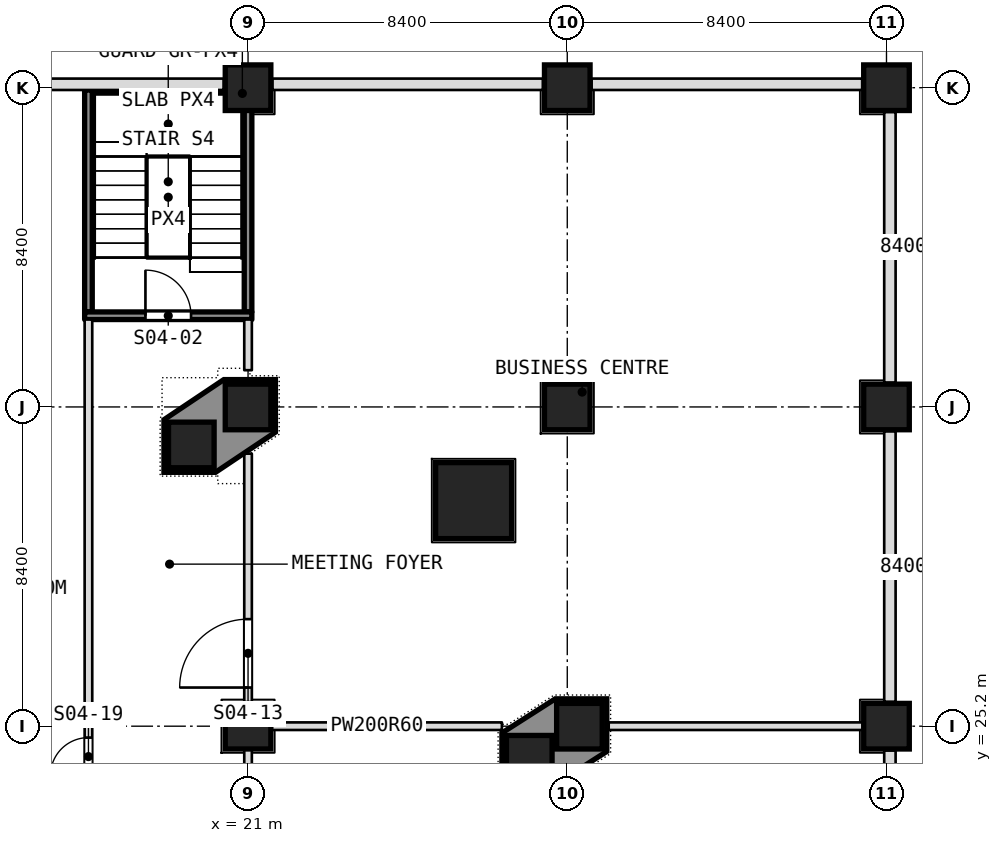
"""IFC4 building model, lengths in metres.
Left out: names, types, materials, properties, quantities, classifications, styles, units other than length and angle.
Written with IfcOpenShell. Run it as: python <this file> out.ifc"""

import sys

from ifc_helpers import new_model, si_unit, direction, frame, frame_2d, origin, origin_2d, place, context, subcontext, project, spatial, polyline, rectangle, outline, extrude, element, fill, save


model = new_model("IFC4")
c1 = context("Model", 3, precision=1e-05, world=origin(), true_north=direction((0.0, 1.0)))
c2 = subcontext(c1, "Body", "Model", "MODEL_VIEW")
j1 = project(units=[si_unit("LENGTHUNIT", "METRE"), si_unit("PLANEANGLEUNIT", "RADIAN")], contexts=[c1])
p1 = place(None, origin())
s1 = spatial("IfcSite", under=j1, at=p1, CompositionType="ELEMENT")
p2 = place(p1, origin())
s2 = spatial("IfcBuilding", under=s1, at=p2, CompositionType="ELEMENT")
p3 = place(p2, frame((0.0, 0.0, 21.0)))
s3 = spatial("IfcBuildingStorey", under=s2, at=p3, CompositionType="ELEMENT", Elevation=21.0)
for number, where, z_axis, x_axis in (
    (1, (21.0, 25.2, 0.0), (0.0, 0.0, 1.0), (1.0, 0.0, 0.0)),
    (2, (29.72, 25.2, 0.0), (0.0, 0.0, 1.0), (1.0, 0.0, 0.0)),
    (3, (37.8, 25.2, 0.0), (0.0, 0.0, 1.0), (1.0, 0.0, 0.0)),
    (4, (21.0, 33.6, 0.0), (0.0, 0.0, 1.0), (1.0, 0.0, 0.0)),
    (5, (29.4, 33.6, 0.0), (0.0, 0.0, 1.0), (1.0, 0.0, 0.0)),
    (6, (37.8, 33.6, 0.0), (0.0, 0.0, 1.0), (1.0, 0.0, 0.0)),
    (7, (21.0, 42.0, 0.0), (0.0, 0.0, 1.0), (1.0, 0.0, 0.0)),
    (8, (29.4, 42.0, 0.0), (0.0, 0.0, 1.0), (1.0, 0.0, 0.0)),
    (9, (37.8, 42.0, 0.0), (0.0, 0.0, 1.0), (1.0, 0.0, 0.0)),
):
    element("IfcColumn", number, at=place(p3, frame(where, z_axis=z_axis, x_axis=x_axis)), inside=s3, PredefinedType="COLUMN", context=c2, shape_type="SweptSolid", body=[
        extrude(rectangle(XDim=1.2, YDim=1.2, at=origin_2d()), origin(), (0.0, 0.0, 1.0), 5.0),
    ])
p4 = place(p3, frame((26.936, 31.135, 0.0), z_axis=(0.0, 0.0, 1.0), x_axis=(1.0, 0.0, 0.0)))
e10 = element("IfcColumn", 10, at=p4, inside=s3, PredefinedType="COLUMN", context=c2, shape_type="SweptSolid", body=[
    extrude(rectangle(XDim=2.0, YDim=2.0, at=origin_2d()), origin(), (0.0, 0.0, 1.0), 5.0),
])
for number, where, z_axis, x_axis in (
    (11, (19.507, 32.6, 0.0), (0.0, 0.0, 1.0), (1.0, 0.0, 0.0)),
    (12, (28.4, 24.356, 0.0), (0.0, 0.0, 1.0), (1.0, 0.0, 0.0)),
):
    element("IfcColumn", number, at=place(p3, frame(where, z_axis=z_axis, x_axis=x_axis)), inside=s3, PredefinedType="COLUMN", context=c2, shape_type="SweptSolid", body=[
        extrude(rectangle(XDim=1.2, YDim=1.2, at=origin_2d()), origin(), (0.0, 0.0, 1.0), 5.0),
    ])
p5 = place(p3, frame((21.0, 9.5, 0.0), z_axis=(0.0, 0.0, 1.0), x_axis=(0.0, 1.0, 0.0)))
e13 = element("IfcWall", 13, at=p5, inside=s3, PredefinedType="PARTITIONING", context=c2, shape_type="SweptSolid", body=[
    extrude(rectangle(XDim=22.871, YDim=0.2, at=frame_2d((11.436, 0.0))), origin(), (0.0, 0.0, 1.0), 4.68),
])
p6 = place(p5, frame((8.3, 0.0, 0.0)))
e14 = element("IfcOpeningElement", 14, at=p6, cuts=e13, PredefinedType="OPENING", context=c2, shape_type="SweptSolid", body=[
    extrude(rectangle(XDim=1.8, YDim=2.1, at=frame_2d((0.9, 1.05))), frame((0.0, 0.1, 0.0), z_axis=(0.0, -1.0, 0.0), x_axis=(1.0, 0.0, 0.0)), (0.0, 0.0, 1.0), 0.2),
])
p7 = place(p5, frame((16.717, 0.0, 0.0)))
e15 = element("IfcOpeningElement", 15, at=p7, cuts=e13, PredefinedType="OPENING", context=c2, shape_type="SweptSolid", body=[
    extrude(rectangle(XDim=1.8, YDim=2.1, at=frame_2d((0.9, 1.05))), frame((0.0, 0.1, 0.0), z_axis=(0.0, -1.0, 0.0), x_axis=(1.0, 0.0, 0.0)), (0.0, 0.0, 1.0), 0.2),
])
p8 = place(p3, frame((21.0, 34.567, 0.0), z_axis=(0.0, 0.0, 1.0), x_axis=(0.0, 1.0, 0.0)))
e16 = element("IfcWall", 16, at=p8, inside=s3, PredefinedType="PARTITIONING", context=c2, shape_type="SweptSolid", body=[
    extrude(rectangle(XDim=1.333, YDim=0.2, at=frame_2d((0.667, 0.0))), origin(), (0.0, 0.0, 1.0), 4.68),
])
p9 = place(p3, frame((21.0, 36.1, 0.0), z_axis=(0.0, 0.0, 1.0), x_axis=(0.0, 1.0, 0.0)))
e17 = element("IfcWall", 17, at=p9, inside=s3, PredefinedType="PARTITIONING", context=c2, shape_type="SweptSolid", body=[
    extrude(rectangle(XDim=6.2, YDim=0.2, at=frame_2d((3.1, 0.0))), origin(), (0.0, 0.0, 1.0), 4.68),
])
p10 = place(p3, frame((16.8, 20.9, 0.0), z_axis=(0.0, 0.0, 1.0), x_axis=(0.0, 1.0, 0.0)))
e18 = element("IfcWall", 18, at=p10, inside=s3, PredefinedType="PARTITIONING", context=c2, shape_type="SweptSolid", body=[
    extrude(rectangle(XDim=15.0, YDim=0.2, at=frame_2d((7.5, 0.0))), origin(), (0.0, 0.0, 1.0), 4.68),
])
p11 = place(p10, frame((3.0, 0.0, 0.0)))
e19 = element("IfcOpeningElement", 19, at=p11, cuts=e18, PredefinedType="OPENING", context=c2, shape_type="SweptSolid", body=[
    extrude(rectangle(XDim=1.0, YDim=2.1, at=frame_2d((0.5, 1.05))), frame((0.0, 0.1, 0.0), z_axis=(0.0, -1.0, 0.0), x_axis=(1.0, 0.0, 0.0)), (0.0, 0.0, 1.0), 0.2),
])
p12 = place(p3, frame((16.8, 36.1, 0.0), z_axis=(0.0, 0.0, 1.0), x_axis=(0.0, 1.0, 0.0)))
e20 = element("IfcWall", 20, at=p12, inside=s3, PredefinedType="PARTITIONING", context=c2, shape_type="SweptSolid", body=[
    extrude(rectangle(XDim=5.84, YDim=0.2, at=frame_2d((2.92, 0.0))), origin(), (0.0, 0.0, 1.0), 4.68),
])
p13 = place(p3, frame((21.1, 25.2, 0.0), z_axis=(0.0, 0.0, 1.0), x_axis=(1.0, 0.0, 0.0)))
e21 = element("IfcWall", 21, at=p13, inside=s3, PredefinedType="PARTITIONING", context=c2, shape_type="SweptSolid", body=[
    extrude(rectangle(XDim=6.58, YDim=0.2, at=frame_2d((3.29, 0.0))), origin(), (0.0, 0.0, 1.0), 4.68),
])
p14 = place(p3, frame((30.49, 25.2, 0.0), z_axis=(0.0, 0.0, 1.0), x_axis=(1.0, 0.0, 0.0)))
e22 = element("IfcWall", 22, at=p14, inside=s3, PredefinedType="PARTITIONING", context=c2, shape_type="SweptSolid", body=[
    extrude(rectangle(XDim=7.61, YDim=0.2, at=frame_2d((3.805, 0.0))), origin(), (0.0, 0.0, 1.0), 4.68),
])
p15 = place(p3, frame((16.7, 36.0, 0.0), z_axis=(0.0, 0.0, 1.0), x_axis=(1.0, 0.0, 0.0)))
e23 = element("IfcWall", 23, at=p15, inside=s3, PredefinedType="PARTITIONING", context=c2, shape_type="SweptSolid", body=[
    extrude(rectangle(XDim=4.4, YDim=0.2, at=frame_2d((2.2, 0.0))), origin(), (0.0, 0.0, 1.0), 4.68),
])
p16 = place(p15, frame((1.6, 0.0, 0.0)))
e24 = element("IfcOpeningElement", 24, at=p16, cuts=e23, PredefinedType="OPENING", context=c2, shape_type="SweptSolid", body=[
    extrude(rectangle(XDim=1.2, YDim=2.1, at=frame_2d((0.6, 1.05))), frame((0.0, 0.1, 0.0), z_axis=(0.0, -1.0, 0.0), x_axis=(1.0, 0.0, 0.0)), (0.0, 0.0, 1.0), 0.2),
])
p17 = place(p3, frame((37.89, 17.44, 0.0), z_axis=(0.0, 0.0, 1.0), x_axis=(0.0, 1.0, 0.0)))
e25 = element("IfcWall", 25, at=p17, inside=s3, PredefinedType="NOTDEFINED", context=c2, shape_type="SweptSolid", body=[
    extrude(rectangle(XDim=7.12, YDim=0.3, at=frame_2d((3.56, 0.0))), origin(), (0.0, 0.0, 1.0), 3.78),
])
p18 = place(p3, frame((37.89, 25.84, 0.0), z_axis=(0.0, 0.0, 1.0), x_axis=(0.0, 1.0, 0.0)))
e26 = element("IfcWall", 26, at=p18, inside=s3, PredefinedType="NOTDEFINED", context=c2, shape_type="SweptSolid", body=[
    extrude(rectangle(XDim=7.12, YDim=0.3, at=frame_2d((3.56, 0.0))), origin(), (0.0, 0.0, 1.0), 3.78),
])
p19 = place(p3, frame((37.89, 34.24, 0.0), z_axis=(0.0, 0.0, 1.0), x_axis=(0.0, 1.0, 0.0)))
e27 = element("IfcWall", 27, at=p19, inside=s3, PredefinedType="NOTDEFINED", context=c2, shape_type="SweptSolid", body=[
    extrude(rectangle(XDim=7.12, YDim=0.3, at=frame_2d((3.56, 0.0))), origin(), (0.0, 0.0, 1.0), 3.78),
])
p20 = place(p3, frame((37.16, 42.09, 0.0), z_axis=(0.0, 0.0, 1.0), x_axis=(-1.0, 0.0, 0.0)))
e28 = element("IfcWall", 28, at=p20, inside=s3, PredefinedType="NOTDEFINED", context=c2, shape_type="SweptSolid", body=[
    extrude(rectangle(XDim=7.12, YDim=0.3, at=frame_2d((3.56, 0.0))), origin(), (0.0, 0.0, 1.0), 3.78),
])
for number, where, z_axis, x_axis in (
    (29, (28.76, 42.09, 0.0), (0.0, 0.0, 1.0), (-1.0, 0.0, 0.0)),
    (30, (20.36, 42.09, 0.0), (0.0, 0.0, 1.0), (-1.0, 0.0, 0.0)),
):
    element("IfcWall", number, at=place(p3, frame(where, z_axis=z_axis, x_axis=x_axis)), inside=s3, PredefinedType="NOTDEFINED", context=c2, shape_type="SweptSolid", body=[
        extrude(rectangle(XDim=7.12, YDim=0.3, at=frame_2d((3.56, 0.0))), origin(), (0.0, 0.0, 1.0), 3.78),
    ])
p21 = place(p3, origin())
e31 = element("IfcWall", 31, at=p21, inside=s3, PredefinedType="SOLIDWALL", context=c2, shape_type="SweptSolid", body=[
    extrude(outline(polyline([(20.364, 34.32), (21.72, 34.32), (21.72, 32.936), (20.143, 31.88), (18.787, 31.88), (18.787, 33.264), (20.364, 34.32)]), holes=[polyline([(21.6, 33.0), (21.6, 34.2), (20.4, 34.2), (20.4, 33.0), (21.6, 33.0)]), polyline([(20.107, 32.0), (20.107, 33.2), (18.907, 33.2), (18.907, 32.0), (20.107, 32.0)])]), origin(), (0.0, 0.0, 1.0), 5.0),
])
p22 = place(p3, origin())
e32 = element("IfcWall", 32, at=p22, inside=s3, PredefinedType="SOLIDWALL", context=c2, shape_type="SweptSolid", body=[
    extrude(outline(polyline([(27.68, 25.022), (29.085, 25.92), (30.44, 25.92), (30.44, 24.534), (29.035, 23.636), (27.68, 23.636), (27.68, 25.022)]), holes=[polyline([(29.12, 24.6), (30.32, 24.6), (30.32, 25.8), (29.12, 25.8), (29.12, 24.6)]), polyline([(27.8, 23.756), (29.0, 23.756), (29.0, 24.956), (27.8, 24.956), (27.8, 23.756)])]), origin(), (0.0, 0.0, 1.0), 5.0),
])
p23 = place(p16, origin())
e33 = element("IfcDoor", 33, at=p23, inside=s3, OperationType="SINGLE_SWING_LEFT", PredefinedType="DOOR", context=c2, shape_type="SweptSolid", body=[
    extrude(rectangle(XDim=1.2, YDim=2.1, at=frame_2d((0.6, 1.05))), frame((0.0, 0.025, 0.0), z_axis=(0.0, -1.0, 0.0), x_axis=(1.0, 0.0, 0.0)), (0.0, 0.0, 1.0), 0.05),
])
fill(e24, e33)
p24 = place(p7, origin())
e34 = element("IfcDoor", 34, at=p24, inside=s3, OperationType="DOUBLE_DOOR_SINGLE_SWING", PredefinedType="DOOR", context=c2, shape_type="SweptSolid", body=[
    extrude(rectangle(XDim=1.8, YDim=2.1, at=frame_2d((0.9, 1.05))), frame((0.0, 0.025, 0.0), z_axis=(0.0, -1.0, 0.0), x_axis=(1.0, 0.0, 0.0)), (0.0, 0.0, 1.0), 0.05),
])
fill(e15, e34)
p25 = place(p11, origin())
e35 = element("IfcDoor", 35, at=p25, inside=s3, OperationType="SINGLE_SWING_RIGHT", PredefinedType="DOOR", context=c2, shape_type="SweptSolid", body=[
    extrude(rectangle(XDim=1.0, YDim=2.1, at=frame_2d((0.5, 1.05))), frame((0.0, 0.025, 0.0), z_axis=(0.0, -1.0, 0.0), x_axis=(1.0, 0.0, 0.0)), (0.0, 0.0, 1.0), 0.05),
])
fill(e19, e35)
save(model, sys.argv[1])
